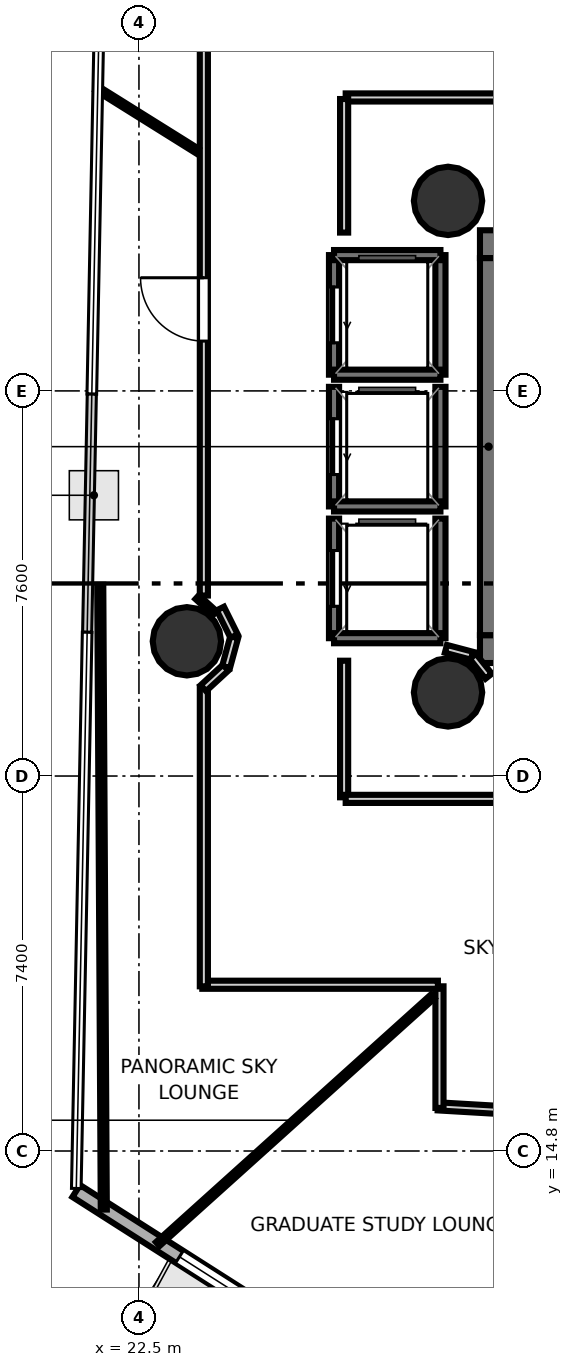
"""IFC4 building model, lengths in metres.
Left out: names, types, materials, properties, quantities, classifications, styles, units other than length and angle.
Written with IfcOpenShell. Run it as: python <this file> out.ifc"""

import sys

from ifc_helpers import new_model, si_unit, direction, frame, frame_2d, origin, origin_2d, place, context, subcontext, project, spatial, rectangle, hollow_circle, extrude, element, fill, save


model = new_model("IFC4")
c1 = context("Model", 3, precision=1e-05, world=origin(), true_north=direction((0.0, 1.0)))
c2 = subcontext(c1, "Body", "Model", "MODEL_VIEW")
j1 = project(units=[si_unit("LENGTHUNIT", "METRE"), si_unit("PLANEANGLEUNIT", "RADIAN")], contexts=[c1])
p1 = place(None, origin())
s1 = spatial("IfcSite", under=j1, at=p1, CompositionType="ELEMENT")
p2 = place(p1, origin())
s2 = spatial("IfcBuilding", under=s1, at=p2, CompositionType="ELEMENT")
p3 = place(p2, frame((0.0, 0.0, 143.1)))
s3 = spatial("IfcBuildingStorey", under=s2, at=p3, CompositionType="ELEMENT", Elevation=143.1)
p4 = place(p3, frame((29.23, 32.695, 0.0), z_axis=(0.0, 0.0, 1.0), x_axis=(1.0, 0.0, 0.0)))
e1 = element("IfcWall", 1, at=p4, inside=s3, PredefinedType="SHEAR", context=c2, shape_type="SweptSolid", body=[
    extrude(rectangle(XDim=10.62, YDim=0.55, at=frame_2d((5.31, 0.0))), origin(), (0.0, 0.0, 1.0), 4.32),
])
p5 = place(p4, frame((0.995, 0.0, 0.0)))
e2 = element("IfcOpeningElement", 2, at=p5, cuts=e1, PredefinedType="OPENING", context=c2, shape_type="SweptSolid", body=[
    extrude(rectangle(XDim=1.25, YDim=2.15, at=frame_2d((0.625, 1.075))), frame((0.0, 0.285, 0.0), z_axis=(0.0, -1.0, 0.0), x_axis=(1.0, 0.0, 0.0)), (0.0, 0.0, 1.0), 0.57),
])
p6 = place(p3, frame((29.23, 24.705, 0.0), z_axis=(0.0, 0.0, 1.0), x_axis=(1.0, 0.0, 0.0)))
e3 = element("IfcWall", 3, at=p6, inside=s3, PredefinedType="SHEAR", context=c2, shape_type="SweptSolid", body=[
    extrude(rectangle(XDim=10.62, YDim=0.55, at=frame_2d((5.31, 0.0))), origin(), (0.0, 0.0, 1.0), 4.32),
])
p7 = place(p6, frame((0.795, 0.0, 0.0)))
e4 = element("IfcOpeningElement", 4, at=p7, cuts=e3, PredefinedType="OPENING", context=c2, shape_type="SweptSolid", body=[
    extrude(rectangle(XDim=1.25, YDim=2.15, at=frame_2d((0.625, 1.075))), frame((0.0, 0.285, 0.0), z_axis=(0.0, -1.0, 0.0), x_axis=(1.0, 0.0, 0.0)), (0.0, 0.0, 1.0), 0.57),
])
p8 = place(p3, frame((29.505, 24.98, 0.0), z_axis=(0.0, 0.0, 1.0), x_axis=(0.0, 1.0, 0.0)))
e5 = element("IfcWall", 5, at=p8, inside=s3, PredefinedType="SHEAR", context=c2, shape_type="SweptSolid", body=[
    extrude(rectangle(XDim=7.44, YDim=0.55, at=frame_2d((3.72, 0.0))), origin(), (0.0, 0.0, 1.0), 4.32),
])
for number, where, z_axis, x_axis in (
    (6, (28.6, 33.55, 0.0), (0.0, 0.0, 1.0), (1.0, 0.0, 0.0)),
    (7, (28.6, 23.85, 0.0), (0.0, 0.0, 1.0), (1.0, 0.0, 0.0)),
):
    element("IfcColumn", number, at=place(p3, frame(where, z_axis=z_axis, x_axis=x_axis)), inside=s3, PredefinedType="COLUMN", context=c2, shape_type="SweptSolid", body=[
        extrude(hollow_circle(Radius=0.675, WallThickness=0.032, at=origin_2d()), origin(), (0.0, 0.0, 1.0), 4.5),
    ])
p9 = place(p3, frame((23.446, 24.859, -0.27), z_axis=(0.0, 0.0, 1.0), x_axis=(1.0, 0.0, 0.0)))
e8 = element("IfcColumn", 8, at=p9, inside=s3, PredefinedType="COLUMN", context=c2, shape_type="SweptSolid", body=[
    extrude(hollow_circle(Radius=0.675, WallThickness=0.032, at=origin_2d()), origin(), (0.0, 0.0, 1.0), 4.77),
])
p10 = place(p3, frame((21.262, 14.011, 0.0), z_axis=(0.0, 0.0, 1.0), x_axis=(0.843341146408, -0.537378554442, 0.0)))
e9 = element("IfcWall", 9, at=p10, inside=s3, PredefinedType="SOLIDWALL", context=c2, shape_type="SweptSolid", body=[
    extrude(rectangle(XDim=9.419, YDim=0.28, at=frame_2d((4.709, 0.0))), origin(), (0.0, 0.0, 1.0), 4.32),
])
p11 = place(p10, frame((2.416, 0.0, 0.85)))
e10 = element("IfcOpeningElement", 10, at=p11, cuts=e9, PredefinedType="OPENING", context=c2, shape_type="SweptSolid", body=[
    extrude(rectangle(XDim=2.1, YDim=2.2, at=frame_2d((1.05, 1.1))), frame((0.0, 0.15, 0.0), z_axis=(0.0, -1.0, 0.0), x_axis=(1.0, 0.0, 0.0)), (0.0, 0.0, 1.0), 0.3),
])
p12 = place(p10, frame((5.543, 0.0, 0.85)))
e11 = element("IfcOpeningElement", 11, at=p12, cuts=e9, PredefinedType="OPENING", context=c2, shape_type="SweptSolid", body=[
    extrude(rectangle(XDim=2.1, YDim=2.2, at=frame_2d((1.05, 1.1))), frame((0.0, 0.15, 0.0), z_axis=(0.0, -1.0, 0.0), x_axis=(1.0, 0.0, 0.0)), (0.0, 0.0, 1.0), 0.3),
])
p13 = place(p3, frame((28.45, 30.12, 0.0), z_axis=(0.0, 0.0, 1.0), x_axis=(0.0, 1.0, 0.0)))
e12 = element("IfcWall", 12, at=p13, inside=s3, PredefinedType="SOLIDWALL", context=c2, shape_type="SweptSolid", body=[
    extrude(rectangle(XDim=2.36, YDim=0.2, at=frame_2d((1.18, 0.0))), origin(), (0.0, 0.0, 1.0), 4.32),
])
p14 = place(p3, frame((26.35, 30.12, 0.0), z_axis=(0.0, 0.0, 1.0), x_axis=(0.0, 1.0, 0.0)))
e13 = element("IfcWall", 13, at=p14, inside=s3, PredefinedType="SOLIDWALL", context=c2, shape_type="SweptSolid", body=[
    extrude(rectangle(XDim=2.36, YDim=0.2, at=frame_2d((1.18, 0.0))), origin(), (0.0, 0.0, 1.0), 4.32),
])
p15 = place(p14, frame((0.63, 0.0, 0.0)))
e14 = element("IfcOpeningElement", 14, at=p15, cuts=e13, PredefinedType="OPENING", context=c2, shape_type="SweptSolid", body=[
    extrude(rectangle(XDim=1.1, YDim=2.15, at=frame_2d((0.55, 1.075))), frame((0.0, 0.11, 0.0), z_axis=(0.0, -1.0, 0.0), x_axis=(1.0, 0.0, 0.0)), (0.0, 0.0, 1.0), 0.22),
])
for number, where, z_axis, x_axis in (
    (15, (26.35, 32.48, 0.0), (0.0, 0.0, 1.0), (1.0, 0.0, 0.0)),
    (16, (26.35, 30.12, 0.0), (0.0, 0.0, 1.0), (1.0, 0.0, 0.0)),
):
    element("IfcWall", number, at=place(p3, frame(where, z_axis=z_axis, x_axis=x_axis)), inside=s3, PredefinedType="SOLIDWALL", context=c2, shape_type="SweptSolid", body=[
        extrude(rectangle(XDim=2.1, YDim=0.2, at=frame_2d((1.05, 0.0))), origin(), (0.0, 0.0, 1.0), 4.32),
    ])
p16 = place(p3, frame((28.45, 27.52, 0.0), z_axis=(0.0, 0.0, 1.0), x_axis=(0.0, 1.0, 0.0)))
e17 = element("IfcWall", 17, at=p16, inside=s3, PredefinedType="SOLIDWALL", context=c2, shape_type="SweptSolid", body=[
    extrude(rectangle(XDim=2.36, YDim=0.2, at=frame_2d((1.18, 0.0))), origin(), (0.0, 0.0, 1.0), 4.32),
])
p17 = place(p3, frame((26.35, 27.52, 0.0), z_axis=(0.0, 0.0, 1.0), x_axis=(0.0, 1.0, 0.0)))
e18 = element("IfcWall", 18, at=p17, inside=s3, PredefinedType="SOLIDWALL", context=c2, shape_type="SweptSolid", body=[
    extrude(rectangle(XDim=2.36, YDim=0.2, at=frame_2d((1.18, 0.0))), origin(), (0.0, 0.0, 1.0), 4.32),
])
p18 = place(p17, frame((0.63, 0.0, 0.0)))
e19 = element("IfcOpeningElement", 19, at=p18, cuts=e18, PredefinedType="OPENING", context=c2, shape_type="SweptSolid", body=[
    extrude(rectangle(XDim=1.1, YDim=2.15, at=frame_2d((0.55, 1.075))), frame((0.0, 0.11, 0.0), z_axis=(0.0, -1.0, 0.0), x_axis=(1.0, 0.0, 0.0)), (0.0, 0.0, 1.0), 0.22),
])
p19 = place(p3, frame((26.35, 27.52, 0.0), z_axis=(0.0, 0.0, 1.0), x_axis=(1.0, 0.0, 0.0)))
e20 = element("IfcWall", 20, at=p19, inside=s3, PredefinedType="SOLIDWALL", context=c2, shape_type="SweptSolid", body=[
    extrude(rectangle(XDim=2.1, YDim=0.2, at=frame_2d((1.05, 0.0))), origin(), (0.0, 0.0, 1.0), 4.32),
])
p20 = place(p3, frame((28.45, 24.92, 0.0), z_axis=(0.0, 0.0, 1.0), x_axis=(0.0, 1.0, 0.0)))
e21 = element("IfcWall", 21, at=p20, inside=s3, PredefinedType="SOLIDWALL", context=c2, shape_type="SweptSolid", body=[
    extrude(rectangle(XDim=2.36, YDim=0.2, at=frame_2d((1.18, 0.0))), origin(), (0.0, 0.0, 1.0), 4.32),
])
p21 = place(p3, frame((26.35, 24.92, 0.0), z_axis=(0.0, 0.0, 1.0), x_axis=(0.0, 1.0, 0.0)))
e22 = element("IfcWall", 22, at=p21, inside=s3, PredefinedType="SOLIDWALL", context=c2, shape_type="SweptSolid", body=[
    extrude(rectangle(XDim=2.36, YDim=0.2, at=frame_2d((1.18, 0.0))), origin(), (0.0, 0.0, 1.0), 4.32),
])
p22 = place(p21, frame((0.63, 0.0, 0.0)))
e23 = element("IfcOpeningElement", 23, at=p22, cuts=e22, PredefinedType="OPENING", context=c2, shape_type="SweptSolid", body=[
    extrude(rectangle(XDim=1.1, YDim=2.15, at=frame_2d((0.55, 1.075))), frame((0.0, 0.11, 0.0), z_axis=(0.0, -1.0, 0.0), x_axis=(1.0, 0.0, 0.0)), (0.0, 0.0, 1.0), 0.22),
])
p23 = place(p3, frame((26.35, 24.92, 0.0), z_axis=(0.0, 0.0, 1.0), x_axis=(1.0, 0.0, 0.0)))
e24 = element("IfcWall", 24, at=p23, inside=s3, PredefinedType="SOLIDWALL", context=c2, shape_type="SweptSolid", body=[
    extrude(rectangle(XDim=2.1, YDim=0.2, at=frame_2d((1.05, 0.0))), origin(), (0.0, 0.0, 1.0), 4.32),
])
p24 = place(p3, frame((29.402, 24.169, 0.0), z_axis=(0.0, 0.0, 1.0), x_axis=(-0.622091855036, 0.782944266151, 0.0)))
e25 = element("IfcWall", 25, at=p24, inside=s3, PredefinedType="PARTITIONING", context=c2, shape_type="SweptSolid", body=[
    extrude(rectangle(XDim=0.504, YDim=0.16, at=frame_2d((0.252, 0.0))), origin(), (0.0, 0.0, 1.0), 3.64),
])
p25 = place(p3, frame((29.072, 24.574, 0.0), z_axis=(0.0, 0.0, 1.0), x_axis=(-0.966842101769, 0.255374920942, 0.0)))
e26 = element("IfcWall", 26, at=p25, inside=s3, PredefinedType="PARTITIONING", context=c2, shape_type="SweptSolid", body=[
    extrude(rectangle(XDim=0.531, YDim=0.16, at=frame_2d((0.266, 0.0))), origin(), (0.0, 0.0, 1.0), 3.64),
])
p26 = place(p3, frame((23.781, 25.762, 0.0), z_axis=(0.0, 0.0, 1.0), x_axis=(0.0, 1.0, 0.0)))
e27 = element("IfcWall", 27, at=p26, inside=s3, PredefinedType="PARTITIONING", context=c2, shape_type="SweptSolid", body=[
    extrude(rectangle(XDim=12.588, YDim=0.16, at=frame_2d((6.294, 0.0))), origin(), (0.0, 0.0, 1.0), 3.64),
])
p27 = place(p26, frame((5.021, 0.0, 0.0)))
e28 = element("IfcOpeningElement", 28, at=p27, cuts=e27, PredefinedType="OPENING", context=c2, shape_type="SweptSolid", body=[
    extrude(rectangle(XDim=1.25, YDim=2.2, at=frame_2d((0.625, 1.1))), frame((0.0, 0.09, 0.0), z_axis=(0.0, -1.0, 0.0), x_axis=(1.0, 0.0, 0.0)), (0.0, 0.0, 1.0), 0.18),
])
p28 = place(p3, frame((29.7, 35.591, 0.0), z_axis=(0.0, 0.0, 1.0), x_axis=(-1.0, 0.0, 0.0)))
e29 = element("IfcWall", 29, at=p28, inside=s3, PredefinedType="PARTITIONING", context=c2, shape_type="SweptSolid", body=[
    extrude(rectangle(XDim=3.12, YDim=0.16, at=frame_2d((1.56, 0.0))), origin(), (0.0, 0.0, 1.0), 3.64),
])
p29 = place(p3, frame((26.549, 35.56, 0.0), z_axis=(0.0, 0.0, 1.0), x_axis=(0.0, -1.0, 0.0)))
e30 = element("IfcWall", 30, at=p29, inside=s3, PredefinedType="PARTITIONING", context=c2, shape_type="SweptSolid", body=[
    extrude(rectangle(XDim=2.636, YDim=0.16, at=frame_2d((1.318, 0.0))), origin(), (0.0, 0.0, 1.0), 3.64),
])
p30 = place(p3, frame((26.549, 24.476, 0.0), z_axis=(0.0, 0.0, 1.0), x_axis=(0.0, -1.0, 0.0)))
e31 = element("IfcWall", 31, at=p30, inside=s3, PredefinedType="PARTITIONING", context=c2, shape_type="SweptSolid", body=[
    extrude(rectangle(XDim=2.696, YDim=0.16, at=frame_2d((1.348, 0.0))), origin(), (0.0, 0.0, 1.0), 3.64),
])
p31 = place(p3, frame((26.58, 21.749, 0.0), z_axis=(0.0, 0.0, 1.0), x_axis=(1.0, 0.0, 0.0)))
e32 = element("IfcWall", 32, at=p31, inside=s3, PredefinedType="PARTITIONING", context=c2, shape_type="SweptSolid", body=[
    extrude(rectangle(XDim=3.12, YDim=0.16, at=frame_2d((1.56, 0.0))), origin(), (0.0, 0.0, 1.0), 3.64),
])
p32 = place(p3, frame((42.914, 14.834, 0.0), z_axis=(0.0, 0.0, 1.0), x_axis=(-0.998301769206, 0.058254421299, 0.0)))
e33 = element("IfcWall", 33, at=p32, inside=s3, PredefinedType="PARTITIONING", context=c2, shape_type="SweptSolid", body=[
    extrude(rectangle(XDim=14.538, YDim=0.16, at=frame_2d((7.269, 0.0))), origin(), (0.0, 0.0, 1.0), 3.64),
])
p33 = place(p32, frame((7.49, 0.0, 0.0)))
e34 = element("IfcOpeningElement", 34, at=p33, cuts=e33, PredefinedType="OPENING", context=c2, shape_type="SweptSolid", body=[
    extrude(rectangle(XDim=1.25, YDim=2.2, at=frame_2d((0.625, 1.1))), frame((0.0, 0.09, 0.0), z_axis=(0.0, -1.0, 0.0), x_axis=(1.0, 0.0, 0.0)), (0.0, 0.0, 1.0), 0.18),
])
p34 = place(p3, frame((28.431, 15.65, 0.0), z_axis=(0.0, 0.0, 1.0), x_axis=(0.0, 1.0, 0.0)))
e35 = element("IfcWall", 35, at=p34, inside=s3, PredefinedType="PARTITIONING", context=c2, shape_type="SweptSolid", body=[
    extrude(rectangle(XDim=2.4, YDim=0.16, at=frame_2d((1.2, 0.0))), origin(), (0.0, 0.0, 1.0), 3.64),
])
p35 = place(p3, frame((28.4, 18.081, 0.0), z_axis=(0.0, 0.0, 1.0), x_axis=(-1.0, 0.0, 0.0)))
e36 = element("IfcWall", 36, at=p35, inside=s3, PredefinedType="PARTITIONING", context=c2, shape_type="SweptSolid", body=[
    extrude(rectangle(XDim=4.65, YDim=0.16, at=frame_2d((2.325, 0.0))), origin(), (0.0, 0.0, 1.0), 3.64),
])
p36 = place(p3, frame((23.781, 18.05, 0.0), z_axis=(0.0, 0.0, 1.0), x_axis=(0.0, 1.0, 0.0)))
e37 = element("IfcWall", 37, at=p36, inside=s3, PredefinedType="PARTITIONING", context=c2, shape_type="SweptSolid", body=[
    extrude(rectangle(XDim=5.906, YDim=0.16, at=frame_2d((2.953, 0.0))), origin(), (0.0, 0.0, 1.0), 3.64),
])
p37 = place(p3, frame((23.771, 23.934, 0.0), z_axis=(0.0, 0.0, 1.0), x_axis=(0.735475561179, 0.677551251868, 0.0)))
e38 = element("IfcWall", 38, at=p37, inside=s3, PredefinedType="PARTITIONING", context=c2, shape_type="SweptSolid", body=[
    extrude(rectangle(XDim=0.598, YDim=0.16, at=frame_2d((0.299, 0.0))), origin(), (0.0, 0.0, 1.0), 3.64),
])
p38 = place(p3, frame((24.22, 24.354, 0.0), z_axis=(0.0, 0.0, 1.0), x_axis=(0.262335473769, 0.964976735058, 0.0)))
e39 = element("IfcWall", 39, at=p38, inside=s3, PredefinedType="PARTITIONING", context=c2, shape_type="SweptSolid", body=[
    extrude(rectangle(XDim=0.608, YDim=0.16, at=frame_2d((0.304, 0.0))), origin(), (0.0, 0.0, 1.0), 3.64),
])
p39 = place(p3, frame((24.377, 24.962, 0.0), z_axis=(0.0, 0.0, 1.0), x_axis=(-0.445765979106, 0.89514953604, 0.0)))
e40 = element("IfcWall", 40, at=p39, inside=s3, PredefinedType="PARTITIONING", context=c2, shape_type="SweptSolid", body=[
    extrude(rectangle(XDim=0.607, YDim=0.16, at=frame_2d((0.304, 0.0))), origin(), (0.0, 0.0, 1.0), 3.64),
])
p40 = place(p3, frame((23.65, 25.731, 0.0), z_axis=(0.0, 0.0, 1.0), x_axis=(0.740268610493, -0.672311225787, 0.0)))
e41 = element("IfcWall", 41, at=p40, inside=s3, PredefinedType="PARTITIONING", context=c2, shape_type="SweptSolid", body=[
    extrude(rectangle(XDim=0.471, YDim=0.105, at=frame_2d((0.235, 0.0))), origin(), (0.0, 0.0, 1.0), 3.64),
])
p41 = place(p3, frame((28.299, 17.852, 0.0), z_axis=(0.0, 0.0, 1.0), x_axis=(-0.743134593783, -0.669141969632, 0.0)))
e42 = element("IfcWall", 42, at=p41, inside=s3, PredefinedType="PARTITIONING", context=c2, shape_type="SweptSolid", body=[
    extrude(rectangle(XDim=7.305, YDim=0.105, at=frame_2d((3.653, 0.0))), origin(), (0.0, 0.0, 1.0), 3.64),
])
p42 = place(p3, frame((21.806, 13.644, 0.0), z_axis=(0.0, 0.0, 1.0), x_axis=(-0.005682851484, 0.999983852469, 0.0)))
e43 = element("IfcWall", 43, at=p42, inside=s3, PredefinedType="PARTITIONING", context=c2, shape_type="SweptSolid", body=[
    extrude(rectangle(XDim=12.33, YDim=0.12, at=frame_2d((6.165, 0.0))), origin(), (0.0, 0.0, 1.0), 3.64),
])
p43 = place(p3, frame((21.67, 35.772, 0.0), z_axis=(0.0, 0.0, 1.0), x_axis=(0.848086274525, -0.529858161174, 0.0)))
e44 = element("IfcWall", 44, at=p43, inside=s3, PredefinedType="PARTITIONING", context=c2, shape_type="SweptSolid", body=[
    extrude(rectangle(XDim=2.338, YDim=0.105, at=frame_2d((1.169, 0.0))), origin(), (0.0, 0.0, 1.0), 3.64),
])
p44 = place(p3, frame((36.226, 12.224, 0.0), z_axis=(0.0, 0.0, 1.0), x_axis=(-0.93330774209, -0.359077510511, 0.0)))
e45 = element("IfcWall", 45, at=p44, inside=s3, PredefinedType="PARTITIONING", context=c2, shape_type="SweptSolid", body=[
    extrude(rectangle(XDim=8.144, YDim=0.12, at=frame_2d((4.072, 0.0))), origin(), (0.0, 0.0, 1.0), 3.64),
])
p45 = place(p15, origin())
e46 = element("IfcDoor", 46, at=p45, inside=s3, OperationType="SLIDING_TO_LEFT", PredefinedType="DOOR", context=c2, shape_type="SweptSolid", body=[
    extrude(rectangle(XDim=1.1, YDim=2.15, at=frame_2d((0.55, 1.075))), frame((0.0, 0.025, 0.0), z_axis=(0.0, -1.0, 0.0), x_axis=(1.0, 0.0, 0.0)), (0.0, 0.0, 1.0), 0.05),
])
fill(e14, e46)
p46 = place(p18, origin())
e47 = element("IfcDoor", 47, at=p46, inside=s3, OperationType="SLIDING_TO_LEFT", PredefinedType="DOOR", context=c2, shape_type="SweptSolid", body=[
    extrude(rectangle(XDim=1.1, YDim=2.15, at=frame_2d((0.55, 1.075))), frame((0.0, 0.025, 0.0), z_axis=(0.0, -1.0, 0.0), x_axis=(1.0, 0.0, 0.0)), (0.0, 0.0, 1.0), 0.05),
])
fill(e19, e47)
p47 = place(p22, origin())
e48 = element("IfcDoor", 48, at=p47, inside=s3, OperationType="SLIDING_TO_LEFT", PredefinedType="DOOR", context=c2, shape_type="SweptSolid", body=[
    extrude(rectangle(XDim=1.1, YDim=2.15, at=frame_2d((0.55, 1.075))), frame((0.0, 0.025, 0.0), z_axis=(0.0, -1.0, 0.0), x_axis=(1.0, 0.0, 0.0)), (0.0, 0.0, 1.0), 0.05),
])
fill(e23, e48)
p48 = place(p27, origin())
e49 = element("IfcDoor", 49, at=p48, inside=s3, OperationType="SINGLE_SWING_RIGHT", PredefinedType="DOOR", context=c2, shape_type="SweptSolid", body=[
    extrude(rectangle(XDim=1.25, YDim=2.2, at=frame_2d((0.625, 1.1))), frame((0.0, 0.025, 0.0), z_axis=(0.0, -1.0, 0.0), x_axis=(1.0, 0.0, 0.0)), (0.0, 0.0, 1.0), 0.05),
])
fill(e28, e49)
p49 = place(p11, origin())
e50 = element("IfcWindow", 50, at=p49, inside=s3, PartitioningType="SINGLE_PANEL", PredefinedType="WINDOW", context=c2, shape_type="SweptSolid", body=[
    extrude(rectangle(XDim=2.1, YDim=2.2, at=frame_2d((1.05, 1.1))), frame((0.0, 0.03, 0.0), z_axis=(0.0, -1.0, 0.0), x_axis=(1.0, 0.0, 0.0)), (0.0, 0.0, 1.0), 0.06),
])
fill(e10, e50)
save(model, sys.argv[1])
